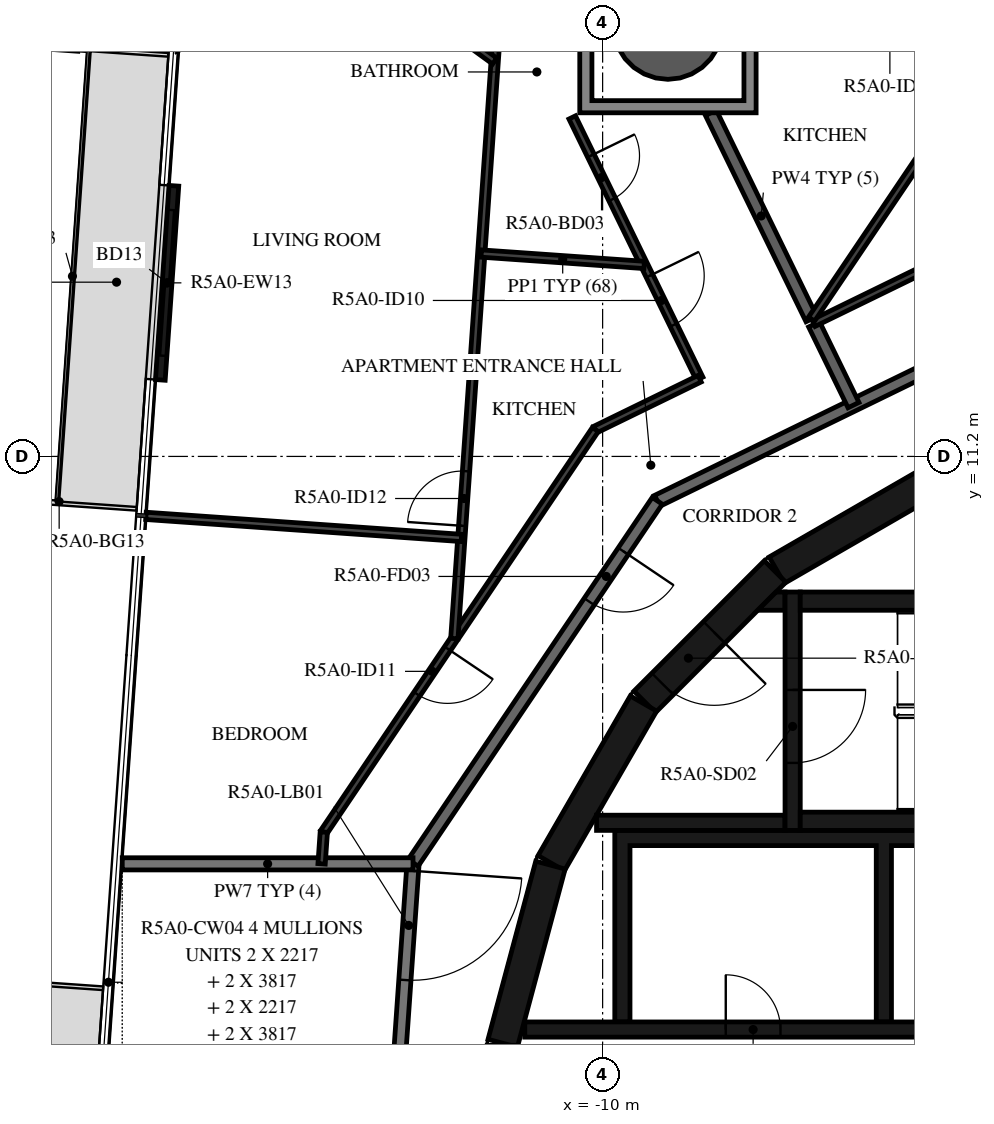
"""IFC4 building model, lengths in metres.
Left out: names, types, materials, properties, quantities, classifications, styles, units other than length and angle.
Written with IfcOpenShell. Run it as: python <this file> out.ifc"""

import sys

from ifc_helpers import new_model, si_unit, direction, frame, frame_2d, origin, origin_2d, place, context, subcontext, project, spatial, polyline, rectangle, hollow_circle, outline, extrude, element, fill, save


model = new_model("IFC4")
c1 = context("Model", 3, precision=1e-05, world=origin(), true_north=direction((0.0, 1.0)))
c2 = subcontext(c1, "Body", "Model", "MODEL_VIEW")
j1 = project(units=[si_unit("LENGTHUNIT", "METRE"), si_unit("PLANEANGLEUNIT", "RADIAN")], contexts=[c1])
p1 = place(None, origin())
s1 = spatial("IfcSite", under=j1, at=p1, CompositionType="ELEMENT")
p2 = place(p1, origin())
s2 = spatial("IfcBuilding", under=s1, at=p2, CompositionType="ELEMENT")
p3 = place(p2, frame((0.0, 0.0, 195.4)))
s3 = spatial("IfcBuildingStorey", under=s2, at=p3, CompositionType="ELEMENT", Elevation=195.4)
p4 = place(p3, frame((-8.926, 18.301, -0.38), z_axis=(0.0, 0.0, 1.0), x_axis=(1.0, 0.0, 0.0)))
e1 = element("IfcColumn", 1, at=p4, inside=s3, PredefinedType="COLUMN", context=c2, shape_type="SweptSolid", body=[
    extrude(hollow_circle(Radius=0.9, WallThickness=0.04, at=origin_2d()), origin(), (0.0, 0.0, 1.0), 3.5),
])
p5 = place(p3, frame((-17.051, 15.65, 0.0), z_axis=(0.0, 0.0, 1.0), x_axis=(-0.069734222855, -0.997565605944, 0.0)))
e2 = element("IfcWall", 2, at=p5, inside=s3, PredefinedType="STANDARD", context=c2, shape_type="SweptSolid", body=[
    extrude(rectangle(XDim=3.2, YDim=0.16, at=frame_2d((1.6, 0.0))), origin(), (0.0, 0.0, 1.0), 3.12),
])
p6 = place(p5, frame((0.4, 0.0, 0.0)))
e3 = element("IfcOpeningElement", 3, at=p6, cuts=e2, PredefinedType="OPENING", context=c2, shape_type="SweptSolid", body=[
    extrude(rectangle(XDim=2.4, YDim=2.4, at=frame_2d((1.2, 1.2))), frame((0.0, 0.09, 0.0), z_axis=(0.0, -1.0, 0.0), x_axis=(1.0, 0.0, 0.0)), (0.0, 0.0, 1.0), 0.18),
])
p7 = place(p3, frame((-4.51, 10.845, 0.0), z_axis=(0.0, 0.0, 1.0), x_axis=(-0.865975092491, -0.500087131594, 0.0)))
e4 = element("IfcWall", 4, at=p7, inside=s3, PredefinedType="SHEAR", context=c2, shape_type="SweptSolid", body=[
    extrude(rectangle(XDim=3.033, YDim=0.5, at=frame_2d((1.516, 0.0))), origin(), (0.0, 0.0, 1.0), 3.12),
])
p8 = place(p3, frame((-7.164, 9.308, 0.0), z_axis=(0.0, 0.0, 1.0), x_axis=(-0.707106781187, -0.707106781187, 0.0)))
e5 = element("IfcWall", 5, at=p8, inside=s3, PredefinedType="SHEAR", context=c2, shape_type="SweptSolid", body=[
    extrude(rectangle(XDim=3.032, YDim=0.5, at=frame_2d((1.516, 0.0))), origin(), (0.0, 0.0, 1.0), 3.12),
])
p9 = place(p8, frame((1.416, 0.0, 0.0)))
e6 = element("IfcOpeningElement", 6, at=p9, cuts=e5, PredefinedType="OPENING", context=c2, shape_type="SweptSolid", body=[
    extrude(rectangle(XDim=1.2, YDim=2.1, at=frame_2d((0.6, 1.05))), frame((0.0, 0.26, 0.0), z_axis=(0.0, -1.0, 0.0), x_axis=(1.0, 0.0, 0.0)), (0.0, 0.0, 1.0), 0.52),
])
for number, where, z_axis, x_axis in (
    (7, (-9.329, 7.137, 0.0), (0.0, 0.0, 1.0), (-0.5, -0.866, 0.0)),
    (8, (-10.858, 4.479, 0.0), (0.0, 0.0, 1.0), (-0.259, -0.966, 0.0)),
):
    element("IfcWall", number, at=place(p3, frame(where, z_axis=z_axis, x_axis=x_axis)), inside=s3, PredefinedType="SHEAR", context=c2, shape_type="SweptSolid", body=[
        extrude(rectangle(XDim=3.033, YDim=0.5, at=frame_2d((1.516, 0.0))), origin(), (0.0, 0.0, 1.0), 3.12),
    ])
for number, where, z_axis, x_axis in (
    (9, (-6.75, 5.2, 0.0), (0.0, 0.0, 1.0), (1.0, 0.0, 0.0)),
    (10, (-6.75, 8.82, 0.0), (0.0, 0.0, 1.0), (1.0, 0.0, 0.0)),
):
    element("IfcWall", number, at=place(p3, frame(where, z_axis=z_axis, x_axis=x_axis)), inside=s3, PredefinedType="SHEAR", context=c2, shape_type="SweptSolid", body=[
        extrude(rectangle(XDim=6.75, YDim=0.3, at=frame_2d((3.375, 0.0))), origin(), (0.0, 0.0, 1.0), 3.12),
    ])
p10 = place(p3, frame((-6.875, 8.97, 0.0), z_axis=(0.0, 0.0, 1.0), x_axis=(0.0, -1.0, 0.0)))
e11 = element("IfcWall", 11, at=p10, inside=s3, PredefinedType="SHEAR", context=c2, shape_type="SweptSolid", body=[
    extrude(rectangle(XDim=3.92, YDim=0.25, at=frame_2d((1.96, 0.0))), origin(), (0.0, 0.0, 1.0), 3.12),
])
p11 = place(p10, frame((1.61, 0.0, 0.0)))
e12 = element("IfcOpeningElement", 12, at=p11, cuts=e11, PredefinedType="OPENING", context=c2, shape_type="SweptSolid", body=[
    extrude(rectangle(XDim=1.2, YDim=2.1, at=frame_2d((0.6, 1.05))), frame((0.0, 0.135, 0.0), z_axis=(0.0, -1.0, 0.0), x_axis=(1.0, 0.0, 0.0)), (0.0, 0.0, 1.0), 0.27),
])
p12 = place(p3, frame((-7.0, 5.175, 0.0), z_axis=(0.0, 0.0, 1.0), x_axis=(-1.0, 0.0, 0.0)))
e13 = element("IfcWall", 13, at=p12, inside=s3, PredefinedType="SHEAR", context=c2, shape_type="SweptSolid", body=[
    extrude(rectangle(XDim=3.1, YDim=0.25, at=frame_2d((1.55, 0.0))), origin(), (0.0, 0.0, 1.0), 3.12),
])
p13 = place(p3, origin())
e14 = element("IfcWall", 14, at=p13, inside=s3, PredefinedType="SHEAR", context=c2, shape_type="SweptSolid", body=[
    extrude(outline(polyline([(-7.148, 8.97), (-7.0, 8.97), (-7.0, 8.67), (-7.448, 8.67), (-7.148, 8.97)])), origin(), (0.0, 0.0, 1.0), 3.12),
])
p14 = place(p3, origin())
e15 = element("IfcWall", 15, at=p14, inside=s3, PredefinedType="SHEAR", context=c2, shape_type="SweptSolid", body=[
    extrude(outline(polyline([(-9.55, 4.8), (-5.5, 4.8), (-5.5, 1.9), (-5.25, 1.9), (-5.25, 4.8), (-1.2, 4.8), (-1.2, 1.9), (-0.95, 1.9), (-0.95, 4.8), (0.95, 4.8), (0.95, 1.9), (1.2, 1.9), (1.2, 4.8), (3.1, 4.8), (3.1, 1.9), (3.35, 1.9), (3.35, 4.8), (5.25, 4.8), (5.25, 1.9), (5.5, 1.9), (5.5, 4.8), (7.4, 4.8), (7.4, 1.9), (7.65, 1.9), (7.65, 4.8), (9.55, 4.8), (9.55, 1.9), (9.8, 1.9), (9.8, 4.8), (9.8, 5.05), (-9.8, 5.05), (-9.8, 4.8), (-9.8, 1.9), (-9.55, 1.9), (-9.55, 4.8)])), origin(), (0.0, 0.0, 1.0), 3.12),
])
p15 = place(p3, frame((-11.28, 1.775, 0.0), z_axis=(0.0, 0.0, 1.0), x_axis=(1.0, 0.0, 0.0)))
e16 = element("IfcWall", 16, at=p15, inside=s3, PredefinedType="SHEAR", context=c2, shape_type="SweptSolid", body=[
    extrude(rectangle(XDim=14.38, YDim=0.25, at=frame_2d((7.19, 0.0))), origin(), (0.0, 0.0, 1.0), 3.12),
])
p16 = place(p15, frame((10.73, 0.0, 0.0)))
e17 = element("IfcOpeningElement", 17, at=p16, cuts=e16, PredefinedType="OPENING", context=c2, shape_type="SweptSolid", body=[
    extrude(rectangle(XDim=1.1, YDim=2.1, at=frame_2d((0.55, 1.05))), frame((0.0, 0.135, 0.0), z_axis=(0.0, -1.0, 0.0), x_axis=(1.0, 0.0, 0.0)), (0.0, 0.0, 1.0), 0.27),
])
p17 = place(p15, frame((12.88, 0.0, 0.0)))
e18 = element("IfcOpeningElement", 18, at=p17, cuts=e16, PredefinedType="OPENING", context=c2, shape_type="SweptSolid", body=[
    extrude(rectangle(XDim=1.1, YDim=2.1, at=frame_2d((0.55, 1.05))), frame((0.0, 0.135, 0.0), z_axis=(0.0, -1.0, 0.0), x_axis=(1.0, 0.0, 0.0)), (0.0, 0.0, 1.0), 0.27),
])
p18 = place(p15, frame((3.305, 0.0, 0.0)))
e19 = element("IfcOpeningElement", 19, at=p18, cuts=e16, PredefinedType="OPENING", context=c2, shape_type="SweptSolid", body=[
    extrude(rectangle(XDim=0.9, YDim=2.1, at=frame_2d((0.45, 1.05))), frame((0.0, 0.135, 0.0), z_axis=(0.0, -1.0, 0.0), x_axis=(1.0, 0.0, 0.0)), (0.0, 0.0, 1.0), 0.27),
])
p19 = place(p15, frame((7.605, 0.0, 0.0)))
e20 = element("IfcOpeningElement", 20, at=p19, cuts=e16, PredefinedType="OPENING", context=c2, shape_type="SweptSolid", body=[
    extrude(rectangle(XDim=0.9, YDim=2.1, at=frame_2d((0.45, 1.05))), frame((0.0, 0.135, 0.0), z_axis=(0.0, -1.0, 0.0), x_axis=(1.0, 0.0, 0.0)), (0.0, 0.0, 1.0), 0.27),
])
p20 = place(p3, frame((-13.118, 4.5, 0.0), z_axis=(0.0, 0.0, 1.0), x_axis=(-0.069746872611, -0.99756472159, 0.0)))
e21 = element("IfcWall", 21, at=p20, inside=s3, PredefinedType="STANDARD", context=c2, shape_type="SweptSolid", body=[
    extrude(rectangle(XDim=3.574, YDim=0.2, at=frame_2d((1.787, 0.0))), origin(), (0.0, 0.0, 1.0), 3.12),
])
p21 = place(p20, frame((0.115, 0.0, 0.0)))
e22 = element("IfcOpeningElement", 22, at=p21, cuts=e21, PredefinedType="OPENING", context=c2, shape_type="SweptSolid", body=[
    extrude(rectangle(XDim=1.8, YDim=2.1, at=frame_2d((0.9, 1.05))), frame((0.0, 0.11, 0.0), z_axis=(0.0, -1.0, 0.0), x_axis=(1.0, 0.0, 0.0)), (0.0, 0.0, 1.0), 0.22),
])
p22 = place(p3, frame((-2.647, 13.618, 0.0), z_axis=(0.0, 0.0, 1.0), x_axis=(-0.898796543751, -0.438366026218, 0.0)))
e23 = element("IfcWall", 23, at=p22, inside=s3, PredefinedType="STANDARD", context=c2, shape_type="SweptSolid", body=[
    extrude(rectangle(XDim=7.181, YDim=0.2, at=frame_2d((3.591, 0.0))), origin(), (0.0, 0.0, 1.0), 3.12),
])
p23 = place(p3, frame((-9.101, 10.47, 0.0), z_axis=(0.0, 0.0, 1.0), x_axis=(-0.559195469534, -0.829035841718, 0.0)))
e24 = element("IfcWall", 24, at=p23, inside=s3, PredefinedType="STANDARD", context=c2, shape_type="SweptSolid", body=[
    extrude(rectangle(XDim=7.181, YDim=0.2, at=frame_2d((3.591, 0.0))), origin(), (0.0, 0.0, 1.0), 3.12),
])
p24 = place(p23, frame((1.0, 0.0, 0.0)))
e25 = element("IfcOpeningElement", 25, at=p24, cuts=e24, PredefinedType="OPENING", context=c2, shape_type="SweptSolid", body=[
    extrude(rectangle(XDim=1.0, YDim=2.1, at=frame_2d((0.5, 1.05))), frame((0.0, 0.11, 0.0), z_axis=(0.0, -1.0, 0.0), x_axis=(1.0, 0.0, 0.0)), (0.0, 0.0, 1.0), 0.22),
])
p25 = place(p3, frame((-13.118, 4.5, 0.0), z_axis=(0.0, 0.0, 1.0), x_axis=(-1.0, 0.0, 0.0)))
e26 = element("IfcWall", 26, at=p25, inside=s3, PredefinedType="STANDARD", context=c2, shape_type="SweptSolid", body=[
    extrude(rectangle(XDim=4.782, YDim=0.2, at=frame_2d((2.391, 0.0))), origin(), (0.0, 0.0, 1.0), 3.12),
])
p26 = place(p3, frame((-6.522, 13.373, 0.0), z_axis=(0.0, 0.0, 1.0), x_axis=(0.438277270821, -0.8988398266, 0.0)))
e27 = element("IfcWall", 27, at=p26, inside=s3, PredefinedType="STANDARD", context=c2, shape_type="SweptSolid", body=[
    extrude(rectangle(XDim=1.479, YDim=0.2, at=frame_2d((0.74, 0.0))), origin(), (0.0, 0.0, 1.0), 3.12),
])
p27 = place(p3, frame((-8.219, 16.851, 0.0), z_axis=(0.0, 0.0, 1.0), x_axis=(0.438291091101, -0.898833087654, 0.0)))
e28 = element("IfcWall", 28, at=p27, inside=s3, PredefinedType="STANDARD", context=c2, shape_type="SweptSolid", body=[
    extrude(rectangle(XDim=3.774, YDim=0.2, at=frame_2d((1.887, 0.0))), origin(), (0.0, 0.0, 1.0), 3.12),
])
p28 = place(p3, frame((-2.943, 15.142, 0.0), z_axis=(0.0, 0.0, 1.0), x_axis=(-0.89881075705, -0.438336883014, 0.0)))
e29 = element("IfcWall", 29, at=p28, inside=s3, PredefinedType="PARTITIONING", context=c2, shape_type="SweptSolid", body=[
    extrude(rectangle(XDim=3.992, YDim=0.12, at=frame_2d((1.996, 0.0))), origin(), (0.0, 0.0, 1.0), 3.12),
])
p29 = place(p3, frame((-7.476, 19.735, 0.0), z_axis=(0.0, 0.0, 1.0), x_axis=(0.829035412992, -0.559196105142, 0.0)))
e30 = element("IfcWall", 30, at=p29, inside=s3, PredefinedType="PARTITIONING", context=c2, shape_type="SweptSolid", body=[
    extrude(rectangle(XDim=8.531, YDim=0.12, at=frame_2d((4.266, 0.0))), origin(), (0.0, 0.0, 1.0), 3.12),
])
p30 = place(p29, frame((2.204, 0.0, 0.0)))
e31 = element("IfcOpeningElement", 31, at=p30, cuts=e30, PredefinedType="OPENING", context=c2, shape_type="SweptSolid", body=[
    extrude(rectangle(XDim=0.9, YDim=2.1, at=frame_2d((0.45, 1.05))), frame((0.0, 0.07, 0.0), z_axis=(0.0, -1.0, 0.0), x_axis=(1.0, 0.0, 0.0)), (0.0, 0.0, 1.0), 0.14),
])
p31 = place(p3, frame((-3.939, 17.35, 0.0), z_axis=(0.0, 0.0, 1.0), x_axis=(-0.559193216274, -0.829037361566, 0.0)))
e32 = element("IfcWall", 32, at=p31, inside=s3, PredefinedType="PARTITIONING", context=c2, shape_type="SweptSolid", body=[
    extrude(rectangle(XDim=4.694, YDim=0.12, at=frame_2d((2.347, 0.0))), origin(), (0.0, 0.0, 1.0), 3.12),
])
p32 = place(p3, frame((-10.5, 16.775, 0.0), z_axis=(0.0, 0.0, 1.0), x_axis=(0.438345136783, -0.898806731761, 0.0)))
e33 = element("IfcWall", 33, at=p32, inside=s3, PredefinedType="PARTITIONING", context=c2, shape_type="SweptSolid", body=[
    extrude(rectangle(XDim=4.78, YDim=0.12, at=frame_2d((2.39, 0.0))), origin(), (0.0, 0.0, 1.0), 3.12),
])
p33 = place(p32, frame((0.7, 0.0, 0.0)))
e34 = element("IfcOpeningElement", 34, at=p33, cuts=e33, PredefinedType="OPENING", context=c2, shape_type="SweptSolid", body=[
    extrude(rectangle(XDim=0.8, YDim=2.1, at=frame_2d((0.4, 1.05))), frame((0.0, 0.07, 0.0), z_axis=(0.0, -1.0, 0.0), x_axis=(1.0, 0.0, 0.0)), (0.0, 0.0, 1.0), 0.14),
])
p34 = place(p32, frame((2.899, 0.0, 0.0)))
e35 = element("IfcOpeningElement", 35, at=p34, cuts=e33, PredefinedType="OPENING", context=c2, shape_type="SweptSolid", body=[
    extrude(rectangle(XDim=0.9, YDim=2.1, at=frame_2d((0.45, 1.05))), frame((0.0, 0.07, 0.0), z_axis=(0.0, -1.0, 0.0), x_axis=(1.0, 0.0, 0.0)), (0.0, 0.0, 1.0), 0.14),
])
p35 = place(p3, frame((-8.405, 12.479, 0.0), z_axis=(0.0, 0.0, 1.0), x_axis=(-0.898784427692, -0.438390867307, 0.0)))
e36 = element("IfcWall", 36, at=p35, inside=s3, PredefinedType="PARTITIONING", context=c2, shape_type="SweptSolid", body=[
    extrude(rectangle(XDim=1.908, YDim=0.12, at=frame_2d((0.954, 0.0))), origin(), (0.0, 0.0, 1.0), 3.12),
])
p36 = place(p3, frame((-10.12, 11.642, 0.0), z_axis=(0.0, 0.0, 1.0), x_axis=(-0.55920080659, -0.829032241779, 0.0)))
e37 = element("IfcWall", 37, at=p36, inside=s3, PredefinedType="PARTITIONING", context=c2, shape_type="SweptSolid", body=[
    extrude(rectangle(XDim=7.985, YDim=0.12, at=frame_2d((3.992, 0.0))), origin(), (0.0, 0.0, 1.0), 3.12),
])
p37 = place(p36, frame((4.346, 0.0, 0.0)))
e38 = element("IfcOpeningElement", 38, at=p37, cuts=e37, PredefinedType="OPENING", context=c2, shape_type="SweptSolid", body=[
    extrude(rectangle(XDim=0.9, YDim=2.1, at=frame_2d((0.45, 1.05))), frame((0.0, 0.07, 0.0), z_axis=(0.0, -1.0, 0.0), x_axis=(1.0, 0.0, 0.0)), (0.0, 0.0, 1.0), 0.14),
])
p38 = place(p3, frame((-14.585, 5.022, 0.0), z_axis=(0.0, 0.0, 1.0), x_axis=(-0.069490327804, -0.997582625321, 0.0)))
e39 = element("IfcWall", 39, at=p38, inside=s3, PredefinedType="PARTITIONING", context=c2, shape_type="SweptSolid", body=[
    extrude(rectangle(XDim=0.523, YDim=0.12, at=frame_2d((0.262, 0.0))), origin(), (0.0, 0.0, 1.0), 3.12),
])
p39 = place(p3, frame((-12.439, 8.204, 0.0), z_axis=(0.0, 0.0, 1.0), x_axis=(0.069750037523, 0.997564500303, 0.0)))
e40 = element("IfcWall", 40, at=p39, inside=s3, PredefinedType="PARTITIONING", context=c2, shape_type="SweptSolid", body=[
    extrude(rectangle(XDim=10.014, YDim=0.12, at=frame_2d((5.007, 0.0))), origin(), (0.0, 0.0, 1.0), 3.12),
])
p40 = place(p39, frame((1.859, 0.0, 0.0)))
e41 = element("IfcOpeningElement", 41, at=p40, cuts=e40, PredefinedType="OPENING", context=c2, shape_type="SweptSolid", body=[
    extrude(rectangle(XDim=0.9, YDim=2.1, at=frame_2d((0.45, 1.05))), frame((0.0, 0.07, 0.0), z_axis=(0.0, -1.0, 0.0), x_axis=(1.0, 0.0, 0.0)), (0.0, 0.0, 1.0), 0.14),
])
p41 = place(p3, frame((-16.395, 21.061, 0.0), z_axis=(0.0, 0.0, 1.0), x_axis=(0.808810002497, -0.58807004673, 0.0)))
e42 = element("IfcWall", 42, at=p41, inside=s3, PredefinedType="PARTITIONING", context=c2, shape_type="SweptSolid", body=[
    extrude(rectangle(XDim=5.713, YDim=0.12, at=frame_2d((2.856, 0.0))), origin(), (0.0, 0.0, 1.0), 3.12),
])
p42 = place(p41, frame((0.2, 0.0, 0.0)))
e43 = element("IfcOpeningElement", 43, at=p42, cuts=e42, PredefinedType="OPENING", context=c2, shape_type="SweptSolid", body=[
    extrude(rectangle(XDim=0.9, YDim=2.1, at=frame_2d((0.45, 1.05))), frame((0.0, 0.07, 0.0), z_axis=(0.0, -1.0, 0.0), x_axis=(1.0, 0.0, 0.0)), (0.0, 0.0, 1.0), 0.14),
])
p43 = place(p3, frame((-11.996, 14.536, 0.0), z_axis=(0.0, 0.0, 1.0), x_axis=(0.997565991425, -0.069728708231, 0.0)))
e44 = element("IfcWall", 44, at=p43, inside=s3, PredefinedType="PARTITIONING", context=c2, shape_type="SweptSolid", body=[
    extrude(rectangle(XDim=2.686, YDim=0.12, at=frame_2d((1.343, 0.0))), origin(), (0.0, 0.0, 1.0), 3.12),
])
p44 = place(p3, frame((-17.51, 10.222, 0.0), z_axis=(0.0, 0.0, 1.0), x_axis=(0.997563184303, -0.069768856397, 0.0)))
e45 = element("IfcWall", 45, at=p44, inside=s3, PredefinedType="PARTITIONING", context=c2, shape_type="SweptSolid", body=[
    extrude(rectangle(XDim=5.2, YDim=0.12, at=frame_2d((2.6, 0.0))), origin(), (0.0, 0.0, 1.0), 2.73),
])
p45 = place(p3, origin())
e46 = element("IfcWall", 46, at=p45, inside=s3, PredefinedType="STANDARD", context=c2, shape_type="SweptSolid", body=[
    extrude(outline(polyline([(-7.476, 19.751), (-7.476, 16.851), (-10.376, 16.851), (-10.376, 19.751), (-7.476, 19.751)]), holes=[polyline([(-10.176, 17.051), (-7.676, 17.051), (-7.676, 19.551), (-10.176, 19.551), (-10.176, 17.051)])]), origin(), (0.0, 0.0, 1.0), 3.12),
])
p46 = place(p6, origin())
e47 = element("IfcDoor", 47, at=p46, inside=s3, OperationType="DOUBLE_DOOR_SLIDING", PredefinedType="DOOR", context=c2, shape_type="SweptSolid", body=[
    extrude(rectangle(XDim=2.4, YDim=2.4, at=frame_2d((1.2, 1.2))), frame((0.0, 0.025, 0.0), z_axis=(0.0, -1.0, 0.0), x_axis=(1.0, 0.0, 0.0)), (0.0, 0.0, 1.0), 0.05),
])
fill(e3, e47)
p47 = place(p11, origin())
e48 = element("IfcDoor", 48, at=p47, inside=s3, OperationType="SINGLE_SWING_LEFT", PredefinedType="DOOR", context=c2, shape_type="SweptSolid", body=[
    extrude(rectangle(XDim=1.2, YDim=2.1, at=frame_2d((0.6, 1.05))), frame((0.0, 0.025, 0.0), z_axis=(0.0, -1.0, 0.0), x_axis=(1.0, 0.0, 0.0)), (0.0, 0.0, 1.0), 0.05),
])
fill(e12, e48)
p48 = place(p9, origin())
e49 = element("IfcDoor", 49, at=p48, inside=s3, OperationType="SINGLE_SWING_RIGHT", PredefinedType="DOOR", context=c2, shape_type="SweptSolid", body=[
    extrude(rectangle(XDim=1.2, YDim=2.1, at=frame_2d((0.6, 1.05))), frame((0.0, 0.025, 0.0), z_axis=(0.0, -1.0, 0.0), x_axis=(1.0, 0.0, 0.0)), (0.0, 0.0, 1.0), 0.05),
])
fill(e6, e49)
p49 = place(p18, origin())
e50 = element("IfcDoor", 50, at=p49, inside=s3, OperationType="SINGLE_SWING_LEFT", PredefinedType="DOOR", context=c2, shape_type="SweptSolid", body=[
    extrude(rectangle(XDim=0.9, YDim=2.1, at=frame_2d((0.45, 1.05))), frame((0.0, 0.025, 0.0), z_axis=(0.0, -1.0, 0.0), x_axis=(1.0, 0.0, 0.0)), (0.0, 0.0, 1.0), 0.05),
])
fill(e19, e50)
p50 = place(p24, origin())
e51 = element("IfcDoor", 51, at=p50, inside=s3, OperationType="SINGLE_SWING_LEFT", PredefinedType="DOOR", context=c2, shape_type="SweptSolid", body=[
    extrude(rectangle(XDim=1.0, YDim=2.1, at=frame_2d((0.5, 1.05))), frame((0.0, 0.025, 0.0), z_axis=(0.0, -1.0, 0.0), x_axis=(1.0, 0.0, 0.0)), (0.0, 0.0, 1.0), 0.05),
])
fill(e25, e51)
p51 = place(p33, origin())
e52 = element("IfcDoor", 52, at=p51, inside=s3, OperationType="SINGLE_SWING_LEFT", PredefinedType="DOOR", context=c2, shape_type="SweptSolid", body=[
    extrude(rectangle(XDim=0.8, YDim=2.1, at=frame_2d((0.4, 1.05))), frame((0.0, 0.025, 0.0), z_axis=(0.0, -1.0, 0.0), x_axis=(1.0, 0.0, 0.0)), (0.0, 0.0, 1.0), 0.05),
])
fill(e34, e52)
p52 = place(p34, origin())
e53 = element("IfcDoor", 53, at=p52, inside=s3, OperationType="SINGLE_SWING_LEFT", PredefinedType="DOOR", context=c2, shape_type="SweptSolid", body=[
    extrude(rectangle(XDim=0.9, YDim=2.1, at=frame_2d((0.45, 1.05))), frame((0.0, 0.025, 0.0), z_axis=(0.0, -1.0, 0.0), x_axis=(1.0, 0.0, 0.0)), (0.0, 0.0, 1.0), 0.05),
])
fill(e35, e53)
p53 = place(p37, origin())
e54 = element("IfcDoor", 54, at=p53, inside=s3, OperationType="SINGLE_SWING_LEFT", PredefinedType="DOOR", context=c2, shape_type="SweptSolid", body=[
    extrude(rectangle(XDim=0.9, YDim=2.1, at=frame_2d((0.45, 1.05))), frame((0.0, 0.025, 0.0), z_axis=(0.0, -1.0, 0.0), x_axis=(1.0, 0.0, 0.0)), (0.0, 0.0, 1.0), 0.05),
])
fill(e38, e54)
p54 = place(p40, origin())
e55 = element("IfcDoor", 55, at=p54, inside=s3, OperationType="SINGLE_SWING_LEFT", PredefinedType="DOOR", context=c2, shape_type="SweptSolid", body=[
    extrude(rectangle(XDim=0.9, YDim=2.1, at=frame_2d((0.45, 1.05))), frame((0.0, 0.025, 0.0), z_axis=(0.0, -1.0, 0.0), x_axis=(1.0, 0.0, 0.0)), (0.0, 0.0, 1.0), 0.05),
])
fill(e41, e55)
p55 = place(p21, origin())
e56 = element("IfcDoor", 56, at=p55, inside=s3, OperationType="DOUBLE_DOOR_SINGLE_SWING", PredefinedType="DOOR", context=c2, shape_type="SweptSolid", body=[
    extrude(rectangle(XDim=1.8, YDim=2.1, at=frame_2d((0.9, 1.05))), frame((0.0, 0.025, 0.0), z_axis=(0.0, -1.0, 0.0), x_axis=(1.0, 0.0, 0.0)), (0.0, 0.0, 1.0), 0.05),
])
fill(e22, e56)
save(model, sys.argv[1])
